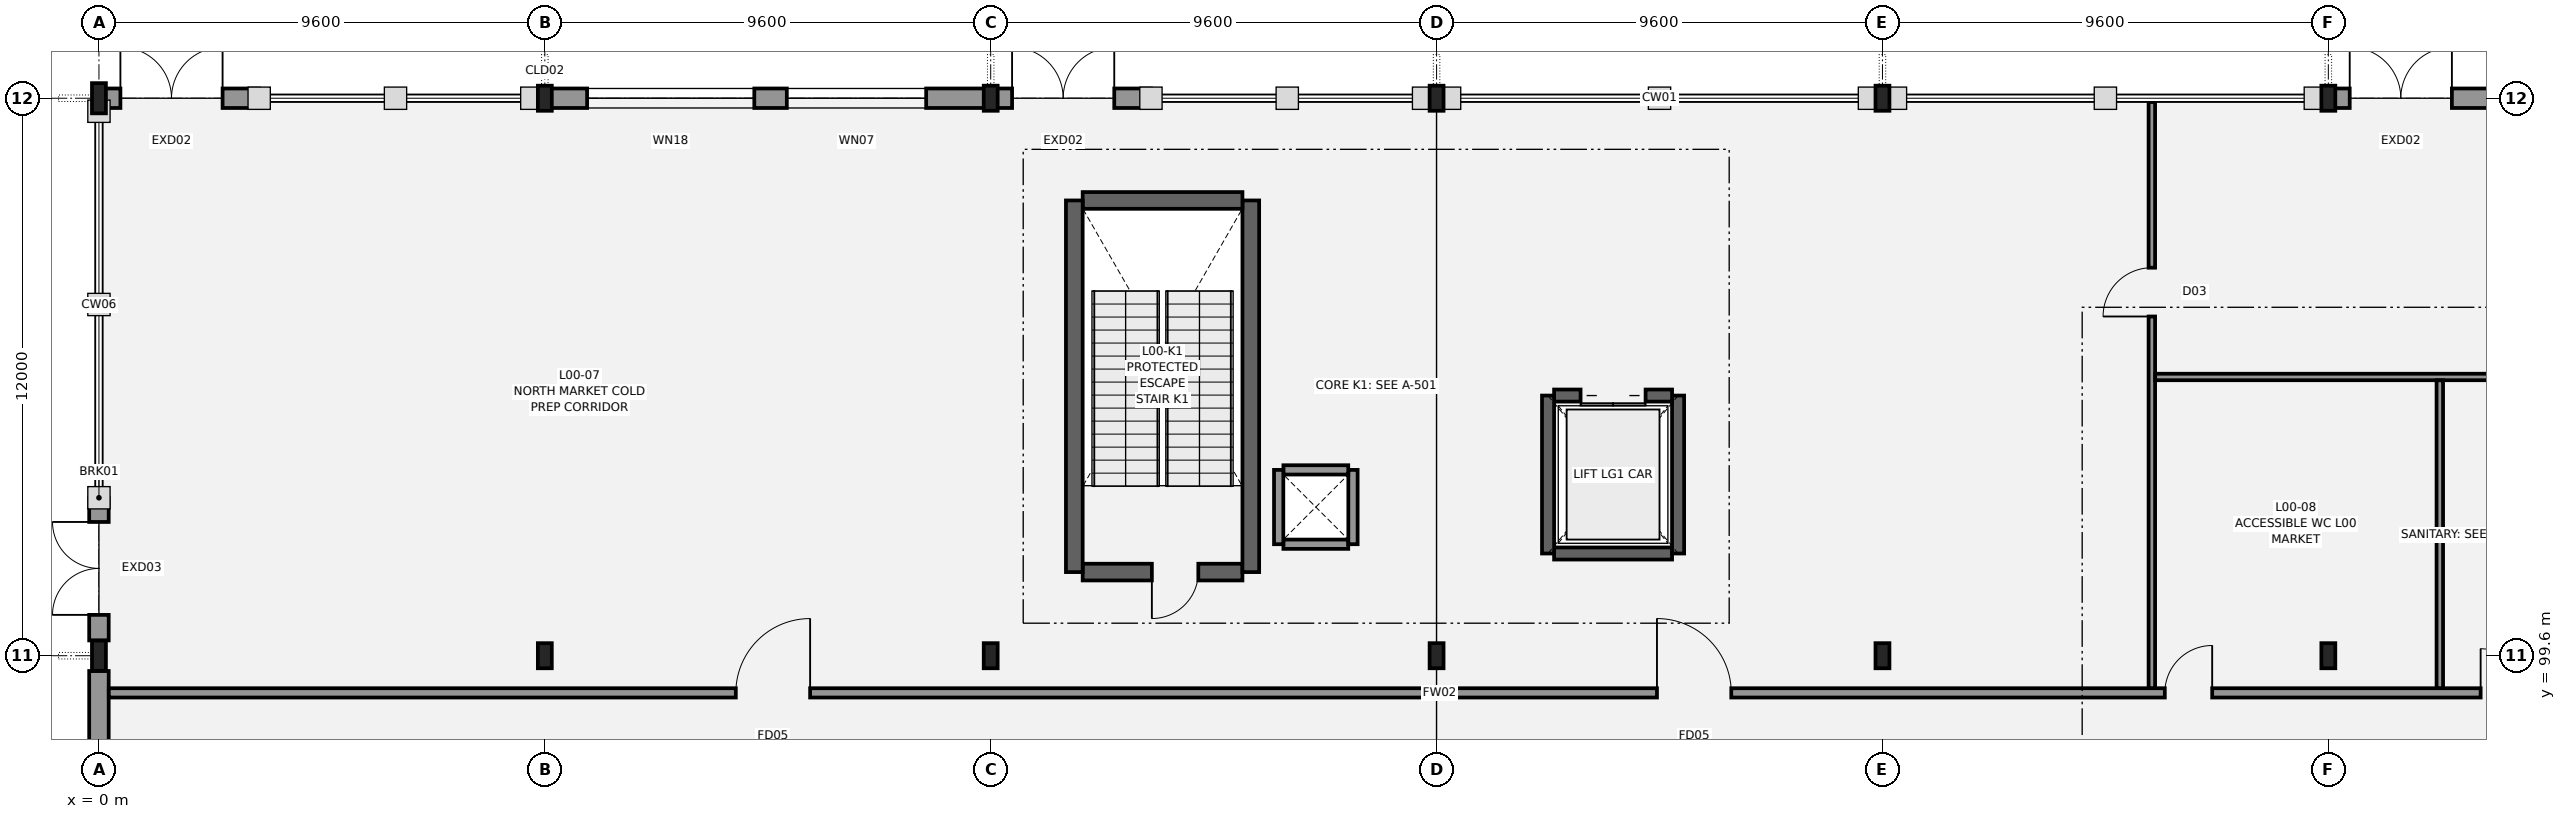
"""IFC4 building model, lengths in metres.
Left out: names, types, materials, properties, quantities, classifications, styles, units other than length and angle.
Written with IfcOpenShell. Run it as: python <this file> out.ifc"""

import sys

from ifc_helpers import new_model, si_unit, direction, frame, frame_2d, origin, origin_2d, place, context, subcontext, project, spatial, rectangle, i_section, extrude, element, fill, save


model = new_model("IFC4")
c1 = context("Model", 3, precision=1e-05, world=origin(), true_north=direction((0.0, 1.0)))
c2 = subcontext(c1, "Body", "Model", "MODEL_VIEW")
j1 = project(units=[si_unit("LENGTHUNIT", "METRE"), si_unit("PLANEANGLEUNIT", "RADIAN")], contexts=[c1])
p1 = place(None, origin())
s1 = spatial("IfcSite", under=j1, at=p1, CompositionType="ELEMENT")
p2 = place(p1, origin())
s2 = spatial("IfcBuilding", under=s1, at=p2, CompositionType="ELEMENT")
p3 = place(p2, origin())
s3 = spatial("IfcBuildingStorey", under=s2, at=p3, CompositionType="ELEMENT", Elevation=0.0)
for number, where, z_axis, x_axis in (
    (1, (0.0, 99.6, 0.0), (0.0, 0.0, 1.0), (1.0, 0.0, 0.0)),
    (2, (0.0, 111.6, 0.0), (0.0, 0.0, 1.0), (1.0, 0.0, 0.0)),
):
    element("IfcColumn", number, at=place(p3, frame(where, z_axis=z_axis, x_axis=x_axis)), inside=s3, PredefinedType="COLUMN", context=c2, shape_type="SweptSolid", body=[
        extrude(i_section(OverallWidth=0.3, OverallDepth=0.65, WebThickness=0.016, FlangeThickness=0.031, FilletRadius=0.027, at=origin_2d()), origin(), (0.0, 0.0, 1.0), 5.4),
    ])
for number, where, z_axis, x_axis in (
    (3, (9.6, 99.6, 0.0), (0.0, 0.0, 1.0), (1.0, 0.0, 0.0)),
    (4, (9.6, 111.6, 0.0), (0.0, 0.0, 1.0), (1.0, 0.0, 0.0)),
    (5, (19.2, 99.6, 0.0), (0.0, 0.0, 1.0), (1.0, 0.0, 0.0)),
    (6, (19.2, 111.6, 0.0), (0.0, 0.0, 1.0), (1.0, 0.0, 0.0)),
    (7, (28.8, 99.6, 0.0), (0.0, 0.0, 1.0), (1.0, 0.0, 0.0)),
    (8, (28.8, 111.6, 0.0), (0.0, 0.0, 1.0), (1.0, 0.0, 0.0)),
    (9, (38.4, 99.6, 0.0), (0.0, 0.0, 1.0), (1.0, 0.0, 0.0)),
    (10, (38.4, 111.6, 0.0), (0.0, 0.0, 1.0), (1.0, 0.0, 0.0)),
    (11, (48.0, 99.6, 0.0), (0.0, 0.0, 1.0), (1.0, 0.0, 0.0)),
    (12, (48.0, 111.6, 0.0), (0.0, 0.0, 1.0), (1.0, 0.0, 0.0)),
):
    element("IfcColumn", number, at=place(p3, frame(where, z_axis=z_axis, x_axis=x_axis)), inside=s3, PredefinedType="COLUMN", context=c2, shape_type="SweptSolid", body=[
        extrude(i_section(OverallWidth=0.3, OverallDepth=0.54, WebThickness=0.012, FlangeThickness=0.024, FilletRadius=0.027, at=origin_2d()), origin(), (0.0, 0.0, 1.0), 5.4),
    ])
p4 = place(p3, frame((24.62, 101.4, 0.0), z_axis=(0.0, 0.0, 1.0), x_axis=(-1.0, 0.0, 0.0)))
e13 = element("IfcWall", 13, at=p4, inside=s3, PredefinedType="SHEAR", context=c2, shape_type="SweptSolid", body=[
    extrude(rectangle(XDim=3.44, YDim=0.36, at=frame_2d((1.72, 0.0))), origin(), (0.0, 0.0, 1.0), 5.12),
])
p5 = place(p4, frame((0.95, 0.0, 0.0)))
e14 = element("IfcOpeningElement", 14, at=p5, cuts=e13, PredefinedType="OPENING", context=c2, shape_type="SweptSolid", body=[
    extrude(rectangle(XDim=1.0, YDim=2.15, at=frame_2d((0.5, 1.075))), frame((0.0, 0.19, 0.0), z_axis=(0.0, -1.0, 0.0), x_axis=(1.0, 0.0, 0.0)), (0.0, 0.0, 1.0), 0.38),
])
p6 = place(p3, frame((24.8, 101.4, 0.0), z_axis=(0.0, 0.0, 1.0), x_axis=(0.0, 1.0, 0.0)))
e15 = element("IfcWall", 15, at=p6, inside=s3, PredefinedType="SHEAR", context=c2, shape_type="SweptSolid", body=[
    extrude(rectangle(XDim=8.0, YDim=0.36, at=frame_2d((4.0, 0.0))), origin(), (0.0, 0.0, 1.0), 5.12),
])
p7 = place(p3, frame((24.62, 109.4, 0.0), z_axis=(0.0, 0.0, 1.0), x_axis=(-1.0, 0.0, 0.0)))
e16 = element("IfcWall", 16, at=p7, inside=s3, PredefinedType="SHEAR", context=c2, shape_type="SweptSolid", body=[
    extrude(rectangle(XDim=3.44, YDim=0.36, at=frame_2d((1.72, 0.0))), origin(), (0.0, 0.0, 1.0), 5.12),
])
p8 = place(p3, frame((21.0, 109.4, 0.0), z_axis=(0.0, 0.0, 1.0), x_axis=(0.0, -1.0, 0.0)))
e17 = element("IfcWall", 17, at=p8, inside=s3, PredefinedType="SHEAR", context=c2, shape_type="SweptSolid", body=[
    extrude(rectangle(XDim=8.0, YDim=0.36, at=frame_2d((4.0, 0.0))), origin(), (0.0, 0.0, 1.0), 5.12),
])
p9 = place(p3, frame((31.33, 101.8, 0.0), z_axis=(0.0, 0.0, 1.0), x_axis=(1.0, 0.0, 0.0)))
e18 = element("IfcWall", 18, at=p9, inside=s3, PredefinedType="SHEAR", context=c2, shape_type="SweptSolid", body=[
    extrude(rectangle(XDim=2.54, YDim=0.26, at=frame_2d((1.27, 0.0))), origin(), (0.0, 0.0, 1.0), 5.12),
])
p10 = place(p3, frame((34.0, 101.8, 0.0), z_axis=(0.0, 0.0, 1.0), x_axis=(0.0, 1.0, 0.0)))
e19 = element("IfcWall", 19, at=p10, inside=s3, PredefinedType="SHEAR", context=c2, shape_type="SweptSolid", body=[
    extrude(rectangle(XDim=3.4, YDim=0.26, at=frame_2d((1.7, 0.0))), origin(), (0.0, 0.0, 1.0), 5.12),
])
p11 = place(p3, frame((33.87, 105.2, 0.0), z_axis=(0.0, 0.0, 1.0), x_axis=(-1.0, 0.0, 0.0)))
e20 = element("IfcWall", 20, at=p11, inside=s3, PredefinedType="SHEAR", context=c2, shape_type="SweptSolid", body=[
    extrude(rectangle(XDim=2.54, YDim=0.26, at=frame_2d((1.27, 0.0))), origin(), (0.0, 0.0, 1.0), 5.12),
])
p12 = place(p11, frame((0.57, 0.0, 0.0)))
e21 = element("IfcOpeningElement", 21, at=p12, cuts=e20, PredefinedType="OPENING", context=c2, shape_type="SweptSolid", body=[
    extrude(rectangle(XDim=1.4, YDim=2.25, at=frame_2d((0.7, 1.125))), frame((0.0, 0.14, 0.0), z_axis=(0.0, -1.0, 0.0), x_axis=(1.0, 0.0, 0.0)), (0.0, 0.0, 1.0), 0.28),
])
p13 = place(p3, frame((31.2, 105.2, 0.0), z_axis=(0.0, 0.0, 1.0), x_axis=(0.0, -1.0, 0.0)))
e22 = element("IfcWall", 22, at=p13, inside=s3, PredefinedType="SHEAR", context=c2, shape_type="SweptSolid", body=[
    extrude(rectangle(XDim=3.4, YDim=0.26, at=frame_2d((1.7, 0.0))), origin(), (0.0, 0.0, 1.0), 5.12),
])
p14 = place(p3, frame((0.0, 87.929, 0.0), z_axis=(0.0, 0.0, 1.0), x_axis=(0.0, 1.0, 0.0)))
e23 = element("IfcWall", 23, at=p14, inside=s3, PredefinedType="STANDARD", context=c2, shape_type="SweptSolid", body=[
    extrude(rectangle(XDim=11.342, YDim=0.42, at=frame_2d((5.671, 0.0))), origin(), (0.0, 0.0, 1.0), 4.7),
])
p15 = place(p3, frame((0.0, 99.929, 0.0), z_axis=(0.0, 0.0, 1.0), x_axis=(0.0, 1.0, 0.0)))
e24 = element("IfcWall", 24, at=p15, inside=s3, PredefinedType="STANDARD", context=c2, shape_type="SweptSolid", body=[
    extrude(rectangle(XDim=3.071, YDim=0.42, at=frame_2d((1.536, 0.0))), origin(), (0.0, 0.0, 1.0), 4.7),
])
p16 = place(p15, frame((0.55, 0.0, 0.0)))
e25 = element("IfcOpeningElement", 25, at=p16, cuts=e24, PredefinedType="OPENING", context=c2, shape_type="SweptSolid", body=[
    extrude(rectangle(XDim=2.0, YDim=2.3, at=frame_2d((1.0, 1.15))), frame((0.0, 0.22, 0.0), z_axis=(0.0, -1.0, 0.0), x_axis=(1.0, 0.0, 0.0)), (0.0, 0.0, 1.0), 0.44),
])
p17 = place(p3, frame((0.012, 111.6, 0.0), z_axis=(0.0, 0.0, 1.0), x_axis=(1.0, 0.0, 0.0)))
e26 = element("IfcWall", 26, at=p17, inside=s3, PredefinedType="STANDARD", context=c2, shape_type="SweptSolid", body=[
    extrude(rectangle(XDim=3.438, YDim=0.42, at=frame_2d((1.719, 0.0))), origin(), (0.0, 0.0, 1.0), 4.7),
])
p18 = place(p17, frame((0.45, 0.0, 0.0)))
e27 = element("IfcOpeningElement", 27, at=p18, cuts=e26, PredefinedType="OPENING", context=c2, shape_type="SweptSolid", body=[
    extrude(rectangle(XDim=2.2, YDim=2.4, at=frame_2d((1.1, 1.2))), frame((0.0, 0.22, 0.0), z_axis=(0.0, -1.0, 0.0), x_axis=(1.0, 0.0, 0.0)), (0.0, 0.0, 1.0), 0.44),
])
p19 = place(p3, frame((9.61, 111.6, 0.0), z_axis=(0.0, 0.0, 1.0), x_axis=(1.0, 0.0, 0.0)))
e28 = element("IfcWall", 28, at=p19, inside=s3, PredefinedType="STANDARD", context=c2, shape_type="SweptSolid", body=[
    extrude(rectangle(XDim=9.58, YDim=0.42, at=frame_2d((4.79, 0.0))), origin(), (0.0, 0.0, 1.0), 4.665),
])
p20 = place(p19, frame((0.9, 0.0, 1.4)))
e29 = element("IfcOpeningElement", 29, at=p20, cuts=e28, PredefinedType="OPENING", context=c2, shape_type="SweptSolid", body=[
    extrude(rectangle(XDim=3.6, YDim=1.2, at=frame_2d((1.8, 0.6))), frame((0.0, 0.22, 0.0), z_axis=(0.0, -1.0, 0.0), x_axis=(1.0, 0.0, 0.0)), (0.0, 0.0, 1.0), 0.44),
])
p21 = place(p19, frame((5.2, 0.0, 1.4)))
e30 = element("IfcOpeningElement", 30, at=p21, cuts=e28, PredefinedType="OPENING", context=c2, shape_type="SweptSolid", body=[
    extrude(rectangle(XDim=3.0, YDim=1.8, at=frame_2d((1.5, 0.9))), frame((0.0, 0.22, 0.0), z_axis=(0.0, -1.0, 0.0), x_axis=(1.0, 0.0, 0.0)), (0.0, 0.0, 1.0), 0.44),
])
p22 = place(p3, frame((19.21, 111.6, 0.0), z_axis=(0.0, 0.0, 1.0), x_axis=(1.0, 0.0, 0.0)))
e31 = element("IfcWall", 31, at=p22, inside=s3, PredefinedType="STANDARD", context=c2, shape_type="SweptSolid", body=[
    extrude(rectangle(XDim=3.44, YDim=0.42, at=frame_2d((1.72, 0.0))), origin(), (0.0, 0.0, 1.0), 4.665),
])
p23 = place(p22, frame((0.45, 0.0, 0.0)))
e32 = element("IfcOpeningElement", 32, at=p23, cuts=e31, PredefinedType="OPENING", context=c2, shape_type="SweptSolid", body=[
    extrude(rectangle(XDim=2.2, YDim=2.4, at=frame_2d((1.1, 1.2))), frame((0.0, 0.22, 0.0), z_axis=(0.0, -1.0, 0.0), x_axis=(1.0, 0.0, 0.0)), (0.0, 0.0, 1.0), 0.44),
])
p24 = place(p3, frame((48.01, 111.6, 0.0), z_axis=(0.0, 0.0, 1.0), x_axis=(1.0, 0.0, 0.0)))
e33 = element("IfcWall", 33, at=p24, inside=s3, PredefinedType="STANDARD", context=c2, shape_type="SweptSolid", body=[
    extrude(rectangle(XDim=3.44, YDim=0.42, at=frame_2d((1.72, 0.0))), origin(), (0.0, 0.0, 1.0), 4.665),
])
p25 = place(p24, frame((0.45, 0.0, 0.0)))
e34 = element("IfcOpeningElement", 34, at=p25, cuts=e33, PredefinedType="OPENING", context=c2, shape_type="SweptSolid", body=[
    extrude(rectangle(XDim=2.2, YDim=2.4, at=frame_2d((1.1, 1.2))), frame((0.0, 0.22, 0.0), z_axis=(0.0, -1.0, 0.0), x_axis=(1.0, 0.0, 0.0)), (0.0, 0.0, 1.0), 0.44),
])
p26 = place(p3, frame((0.212, 98.8, 0.0), z_axis=(0.0, 0.0, 1.0), x_axis=(1.0, 0.0, 0.0)))
e35 = element("IfcWall", 35, at=p26, inside=s3, PredefinedType="PARTITIONING", context=c2, shape_type="SweptSolid", body=[
    extrude(rectangle(XDim=57.306, YDim=0.2, at=frame_2d((28.653, 0.0))), origin(), (0.0, 0.0, 1.0), 5.04),
])
p27 = place(p26, frame((13.5, 0.0, 0.0)))
e36 = element("IfcOpeningElement", 36, at=p27, cuts=e35, PredefinedType="OPENING", context=c2, shape_type="SweptSolid", body=[
    extrude(rectangle(XDim=1.6, YDim=2.2, at=frame_2d((0.8, 1.1))), frame((0.0, 0.11, 0.0), z_axis=(0.0, -1.0, 0.0), x_axis=(1.0, 0.0, 0.0)), (0.0, 0.0, 1.0), 0.22),
])
p28 = place(p26, frame((33.333, 0.0, 0.0)))
e37 = element("IfcOpeningElement", 37, at=p28, cuts=e35, PredefinedType="OPENING", context=c2, shape_type="SweptSolid", body=[
    extrude(rectangle(XDim=1.6, YDim=2.2, at=frame_2d((0.8, 1.1))), frame((0.0, 0.11, 0.0), z_axis=(0.0, -1.0, 0.0), x_axis=(1.0, 0.0, 0.0)), (0.0, 0.0, 1.0), 0.22),
])
p29 = place(p26, frame((44.267, 0.0, 0.0)))
e38 = element("IfcOpeningElement", 38, at=p29, cuts=e35, PredefinedType="OPENING", context=c2, shape_type="SweptSolid", body=[
    extrude(rectangle(XDim=1.02, YDim=2.12, at=frame_2d((0.51, 1.06))), frame((0.0, 0.11, 0.0), z_axis=(0.0, -1.0, 0.0), x_axis=(1.0, 0.0, 0.0)), (0.0, 0.0, 1.0), 0.22),
])
p30 = place(p26, frame((51.067, 0.0, 0.0)))
e39 = element("IfcOpeningElement", 39, at=p30, cuts=e35, PredefinedType="OPENING", context=c2, shape_type="SweptSolid", body=[
    extrude(rectangle(XDim=0.95, YDim=2.1, at=frame_2d((0.475, 1.05))), frame((0.0, 0.11, 0.0), z_axis=(0.0, -1.0, 0.0), x_axis=(1.0, 0.0, 0.0)), (0.0, 0.0, 1.0), 0.22),
])
p31 = place(p26, frame((54.0, 0.0, 0.0)))
e40 = element("IfcOpeningElement", 40, at=p31, cuts=e35, PredefinedType="OPENING", context=c2, shape_type="SweptSolid", body=[
    extrude(rectangle(XDim=1.0, YDim=2.1, at=frame_2d((0.5, 1.05))), frame((0.0, 0.11, 0.0), z_axis=(0.0, -1.0, 0.0), x_axis=(1.0, 0.0, 0.0)), (0.0, 0.0, 1.0), 0.22),
])
p32 = place(p3, frame((44.2, 98.902, 0.0), z_axis=(0.0, 0.0, 1.0), x_axis=(0.0, 1.0, 0.0)))
e41 = element("IfcWall", 41, at=p32, inside=s3, PredefinedType="PARTITIONING", context=c2, shape_type="SweptSolid", body=[
    extrude(rectangle(XDim=12.616, YDim=0.14, at=frame_2d((6.308, 0.0))), origin(), (0.0, 0.0, 1.0), 5.04),
])
p33 = place(p32, frame((8.0, 0.0, 0.0)))
e42 = element("IfcOpeningElement", 42, at=p33, cuts=e41, PredefinedType="OPENING", context=c2, shape_type="SweptSolid", body=[
    extrude(rectangle(XDim=1.05, YDim=2.15, at=frame_2d((0.525, 1.075))), frame((0.0, 0.08, 0.0), z_axis=(0.0, -1.0, 0.0), x_axis=(1.0, 0.0, 0.0)), (0.0, 0.0, 1.0), 0.16),
])
p34 = place(p3, frame((44.272, 105.6, 0.0), z_axis=(0.0, 0.0, 1.0), x_axis=(1.0, 0.0, 0.0)))
e43 = element("IfcWall", 43, at=p34, inside=s3, PredefinedType="PARTITIONING", context=c2, shape_type="SweptSolid", body=[
    extrude(rectangle(XDim=13.136, YDim=0.14, at=frame_2d((6.568, 0.0))), origin(), (0.0, 0.0, 1.0), 5.04),
])
p35 = place(p3, frame((50.4, 98.902, 0.0), z_axis=(0.0, 0.0, 1.0), x_axis=(0.0, 1.0, 0.0)))
e44 = element("IfcWall", 44, at=p35, inside=s3, PredefinedType="PARTITIONING", context=c2, shape_type="SweptSolid", body=[
    extrude(rectangle(XDim=6.626, YDim=0.14, at=frame_2d((3.313, 0.0))), origin(), (0.0, 0.0, 1.0), 5.04),
])
p36 = place(p3, frame((25.502, 102.0, 0.0), z_axis=(0.0, 0.0, 1.0), x_axis=(1.0, 0.0, 0.0)))
e45 = element("IfcWall", 45, at=p36, inside=s3, PredefinedType="PARTITIONING", context=c2, shape_type="SweptSolid", body=[
    extrude(rectangle(XDim=1.396, YDim=0.2, at=frame_2d((0.698, 0.0))), origin(), (0.0, 0.0, 1.0), 5.04),
])
p37 = place(p3, frame((27.0, 102.0, 0.0), z_axis=(0.0, 0.0, 1.0), x_axis=(0.0, 1.0, 0.0)))
e46 = element("IfcWall", 46, at=p37, inside=s3, PredefinedType="PARTITIONING", context=c2, shape_type="SweptSolid", body=[
    extrude(rectangle(XDim=1.6, YDim=0.2, at=frame_2d((0.8, 0.0))), origin(), (0.0, 0.0, 1.0), 5.04),
])
p38 = place(p3, frame((26.898, 103.6, 0.0), z_axis=(0.0, 0.0, 1.0), x_axis=(-1.0, 0.0, 0.0)))
e47 = element("IfcWall", 47, at=p38, inside=s3, PredefinedType="PARTITIONING", context=c2, shape_type="SweptSolid", body=[
    extrude(rectangle(XDim=1.396, YDim=0.2, at=frame_2d((0.698, 0.0))), origin(), (0.0, 0.0, 1.0), 5.04),
])
p39 = place(p3, frame((25.4, 103.6, 0.0), z_axis=(0.0, 0.0, 1.0), x_axis=(0.0, -1.0, 0.0)))
e48 = element("IfcWall", 48, at=p39, inside=s3, PredefinedType="PARTITIONING", context=c2, shape_type="SweptSolid", body=[
    extrude(rectangle(XDim=1.6, YDim=0.2, at=frame_2d((0.8, 0.0))), origin(), (0.0, 0.0, 1.0), 5.04),
])
p40 = place(p16, origin())
e49 = element("IfcDoor", 49, at=p40, inside=s3, OperationType="DOUBLE_DOOR_SINGLE_SWING", PredefinedType="DOOR", context=c2, shape_type="SweptSolid", body=[
    extrude(rectangle(XDim=2.0, YDim=2.3, at=frame_2d((1.0, 1.15))), frame((0.0, 0.025, 0.0), z_axis=(0.0, -1.0, 0.0), x_axis=(1.0, 0.0, 0.0)), (0.0, 0.0, 1.0), 0.05),
])
fill(e25, e49)
p41 = place(p18, origin())
e50 = element("IfcDoor", 50, at=p41, inside=s3, OperationType="DOUBLE_DOOR_SINGLE_SWING", PredefinedType="DOOR", context=c2, shape_type="SweptSolid", body=[
    extrude(rectangle(XDim=2.2, YDim=2.4, at=frame_2d((1.1, 1.2))), frame((0.0, 0.025, 0.0), z_axis=(0.0, -1.0, 0.0), x_axis=(1.0, 0.0, 0.0)), (0.0, 0.0, 1.0), 0.05),
])
fill(e27, e50)
p42 = place(p20, origin())
e51 = element("IfcWindow", 51, at=p42, inside=s3, PartitioningType="SINGLE_PANEL", PredefinedType="WINDOW", context=c2, shape_type="SweptSolid", body=[
    extrude(rectangle(XDim=3.6, YDim=1.2, at=frame_2d((1.8, 0.6))), frame((0.0, 0.03, 0.0), z_axis=(0.0, -1.0, 0.0), x_axis=(1.0, 0.0, 0.0)), (0.0, 0.0, 1.0), 0.06),
])
fill(e29, e51)
p43 = place(p21, origin())
e52 = element("IfcWindow", 52, at=p43, inside=s3, PartitioningType="SINGLE_PANEL", PredefinedType="WINDOW", context=c2, shape_type="SweptSolid", body=[
    extrude(rectangle(XDim=3.0, YDim=1.8, at=frame_2d((1.5, 0.9))), frame((0.0, 0.03, 0.0), z_axis=(0.0, -1.0, 0.0), x_axis=(1.0, 0.0, 0.0)), (0.0, 0.0, 1.0), 0.06),
])
fill(e30, e52)
p44 = place(p23, origin())
e53 = element("IfcDoor", 53, at=p44, inside=s3, OperationType="DOUBLE_DOOR_SINGLE_SWING", PredefinedType="DOOR", context=c2, shape_type="SweptSolid", body=[
    extrude(rectangle(XDim=2.2, YDim=2.4, at=frame_2d((1.1, 1.2))), frame((0.0, 0.025, 0.0), z_axis=(0.0, -1.0, 0.0), x_axis=(1.0, 0.0, 0.0)), (0.0, 0.0, 1.0), 0.05),
])
fill(e32, e53)
p45 = place(p25, origin())
e54 = element("IfcDoor", 54, at=p45, inside=s3, OperationType="DOUBLE_DOOR_SINGLE_SWING", PredefinedType="DOOR", context=c2, shape_type="SweptSolid", body=[
    extrude(rectangle(XDim=2.2, YDim=2.4, at=frame_2d((1.1, 1.2))), frame((0.0, 0.025, 0.0), z_axis=(0.0, -1.0, 0.0), x_axis=(1.0, 0.0, 0.0)), (0.0, 0.0, 1.0), 0.05),
])
fill(e34, e54)
p46 = place(p27, origin())
e55 = element("IfcDoor", 55, at=p46, inside=s3, OperationType="SINGLE_SWING_RIGHT", PredefinedType="DOOR", context=c2, shape_type="SweptSolid", body=[
    extrude(rectangle(XDim=1.6, YDim=2.2, at=frame_2d((0.8, 1.1))), frame((0.0, 0.025, 0.0), z_axis=(0.0, -1.0, 0.0), x_axis=(1.0, 0.0, 0.0)), (0.0, 0.0, 1.0), 0.05),
])
fill(e36, e55)
p47 = place(p28, origin())
e56 = element("IfcDoor", 56, at=p47, inside=s3, OperationType="SINGLE_SWING_LEFT", PredefinedType="DOOR", context=c2, shape_type="SweptSolid", body=[
    extrude(rectangle(XDim=1.6, YDim=2.2, at=frame_2d((0.8, 1.1))), frame((0.0, 0.025, 0.0), z_axis=(0.0, -1.0, 0.0), x_axis=(1.0, 0.0, 0.0)), (0.0, 0.0, 1.0), 0.05),
])
fill(e37, e56)
p48 = place(p29, origin())
e57 = element("IfcDoor", 57, at=p48, inside=s3, OperationType="SINGLE_SWING_RIGHT", PredefinedType="DOOR", context=c2, shape_type="SweptSolid", body=[
    extrude(rectangle(XDim=1.02, YDim=2.12, at=frame_2d((0.51, 1.06))), frame((0.0, 0.025, 0.0), z_axis=(0.0, -1.0, 0.0), x_axis=(1.0, 0.0, 0.0)), (0.0, 0.0, 1.0), 0.05),
])
fill(e38, e57)
p49 = place(p30, origin())
e58 = element("IfcDoor", 58, at=p49, inside=s3, OperationType="SINGLE_SWING_LEFT", PredefinedType="DOOR", context=c2, shape_type="SweptSolid", body=[
    extrude(rectangle(XDim=0.95, YDim=2.1, at=frame_2d((0.475, 1.05))), frame((0.0, 0.025, 0.0), z_axis=(0.0, -1.0, 0.0), x_axis=(1.0, 0.0, 0.0)), (0.0, 0.0, 1.0), 0.05),
])
fill(e39, e58)
p50 = place(p33, origin())
e59 = element("IfcDoor", 59, at=p50, inside=s3, OperationType="SINGLE_SWING_LEFT", PredefinedType="DOOR", context=c2, shape_type="SweptSolid", body=[
    extrude(rectangle(XDim=1.05, YDim=2.15, at=frame_2d((0.525, 1.075))), frame((0.0, 0.025, 0.0), z_axis=(0.0, -1.0, 0.0), x_axis=(1.0, 0.0, 0.0)), (0.0, 0.0, 1.0), 0.05),
])
fill(e42, e59)
p51 = place(p5, origin())
e60 = element("IfcDoor", 60, at=p51, inside=s3, OperationType="SINGLE_SWING_RIGHT", PredefinedType="DOOR", context=c2, shape_type="SweptSolid", body=[
    extrude(rectangle(XDim=1.0, YDim=2.15, at=frame_2d((0.5, 1.075))), frame((0.0, 0.025, 0.0), z_axis=(0.0, -1.0, 0.0), x_axis=(1.0, 0.0, 0.0)), (0.0, 0.0, 1.0), 0.05),
])
fill(e14, e60)
p52 = place(p12, origin())
e61 = element("IfcDoor", 61, at=p52, inside=s3, OperationType="DOUBLE_DOOR_SLIDING", PredefinedType="DOOR", context=c2, shape_type="SweptSolid", body=[
    extrude(rectangle(XDim=1.4, YDim=2.25, at=frame_2d((0.7, 1.125))), frame((0.0, 0.025, 0.0), z_axis=(0.0, -1.0, 0.0), x_axis=(1.0, 0.0, 0.0)), (0.0, 0.0, 1.0), 0.05),
])
fill(e21, e61)
save(model, sys.argv[1])
